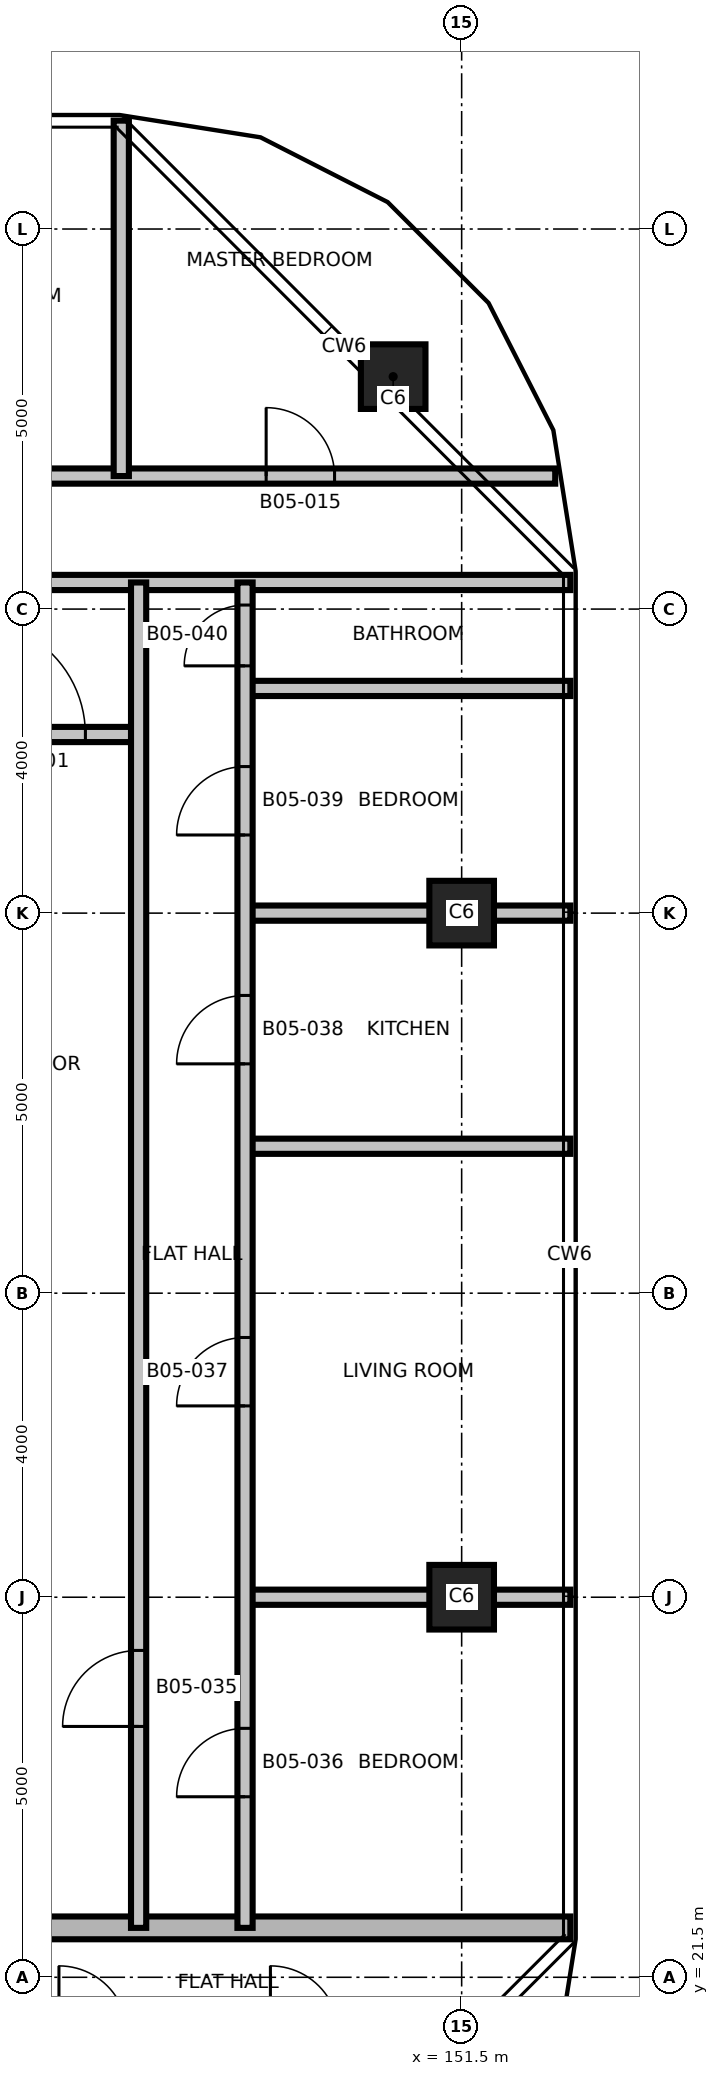
"""IFC4 building model, lengths in metres.
Left out: names, types, materials, properties, quantities, classifications, styles, units other than length and angle.
Written with IfcOpenShell. Run it as: python <this file> out.ifc"""

import sys

from ifc_helpers import new_model, si_unit, direction, frame, frame_2d, origin, origin_2d, place, context, subcontext, project, spatial, rectangle, extrude, element, fill, save


model = new_model("IFC4")
c1 = context("Model", 3, precision=1e-05, world=origin(), true_north=direction((0.0, 1.0)))
c2 = subcontext(c1, "Body", "Model", "MODEL_VIEW")
j1 = project(units=[si_unit("LENGTHUNIT", "METRE"), si_unit("PLANEANGLEUNIT", "RADIAN")], contexts=[c1])
p1 = place(None, origin())
s1 = spatial("IfcSite", under=j1, at=p1, CompositionType="ELEMENT")
p2 = place(p1, origin())
s2 = spatial("IfcBuilding", under=s1, at=p2, CompositionType="ELEMENT")
p3 = place(p2, frame((0.0, 0.0, 74.2)))
s3 = spatial("IfcBuildingStorey", under=s2, at=p3, CompositionType="ELEMENT", Elevation=74.2)
for number, where, z_axis, x_axis in (
    (1, (151.5, 26.5, 0.0), (0.0, 0.0, 1.0), (1.0, 0.0, 0.0)),
    (2, (151.5, 35.5, 0.0), (0.0, 0.0, 1.0), (1.0, 0.0, 0.0)),
    (3, (150.599, 42.558, 0.0), (0.0, 0.0, 1.0), (1.0, 0.0, 0.0)),
):
    element("IfcColumn", number, at=place(p3, frame(where, z_axis=z_axis, x_axis=x_axis)), inside=s3, PredefinedType="COLUMN", context=c2, shape_type="SweptSolid", body=[
        extrude(rectangle(XDim=0.85, YDim=0.85, at=origin_2d()), origin(), (0.0, 0.0, 1.0), 3.7),
    ])
p4 = place(p3, frame((120.07, 22.15, 0.0), z_axis=(0.0, 0.0, 1.0), x_axis=(1.0, 0.0, 0.0)))
e4 = element("IfcWall", 4, at=p4, inside=s3, PredefinedType="SHEAR", context=c2, shape_type="SweptSolid", body=[
    extrude(rectangle(XDim=32.86, YDim=0.3, at=frame_2d((16.43, 0.0))), origin(), (0.0, 0.0, 1.0), 3.4),
])
p5 = place(p4, frame((22.68, 0.0, 0.0)))
e5 = element("IfcOpeningElement", 5, at=p5, cuts=e4, PredefinedType="OPENING", context=c2, shape_type="SweptSolid", body=[
    extrude(rectangle(XDim=1.0, YDim=2.1, at=frame_2d((0.5, 1.05))), frame((0.0, 0.16, 0.0), z_axis=(0.0, -1.0, 0.0), x_axis=(1.0, 0.0, 0.0)), (0.0, 0.0, 1.0), 0.32),
])
p6 = place(p4, frame((11.03, 0.0, 0.0)))
e6 = element("IfcOpeningElement", 6, at=p6, cuts=e4, PredefinedType="OPENING", context=c2, shape_type="SweptSolid", body=[
    extrude(rectangle(XDim=1.0, YDim=2.1, at=frame_2d((0.5, 1.05))), frame((0.0, 0.16, 0.0), z_axis=(0.0, -1.0, 0.0), x_axis=(1.0, 0.0, 0.0)), (0.0, 0.0, 1.0), 0.32),
])
p7 = place(p4, frame((24.58, 0.0, 0.0)))
e7 = element("IfcOpeningElement", 7, at=p7, cuts=e4, PredefinedType="OPENING", context=c2, shape_type="SweptSolid", body=[
    extrude(rectangle(XDim=1.0, YDim=2.1, at=frame_2d((0.5, 1.05))), frame((0.0, 0.16, 0.0), z_axis=(0.0, -1.0, 0.0), x_axis=(1.0, 0.0, 0.0)), (0.0, 0.0, 1.0), 0.32),
])
p8 = place(p4, frame((16.68, 0.0, 0.0)))
e8 = element("IfcOpeningElement", 8, at=p8, cuts=e4, PredefinedType="OPENING", context=c2, shape_type="SweptSolid", body=[
    extrude(rectangle(XDim=0.9, YDim=2.1, at=frame_2d((0.45, 1.05))), frame((0.0, 0.16, 0.0), z_axis=(0.0, -1.0, 0.0), x_axis=(1.0, 0.0, 0.0)), (0.0, 0.0, 1.0), 0.32),
])
for number, where, z_axis, x_axis in (
    (9, (148.65, 26.5, 0.0), (0.0, 0.0, 1.0), (1.0, 0.0, 0.0)),
    (10, (148.65, 32.433, 0.0), (0.0, 0.0, 1.0), (1.0, 0.0, 0.0)),
    (11, (148.65, 35.5, 0.0), (0.0, 0.0, 1.0), (1.0, 0.0, 0.0)),
):
    element("IfcWall", number, at=place(p3, frame(where, z_axis=z_axis, x_axis=x_axis)), inside=s3, PredefinedType="PARTITIONING", context=c2, shape_type="SweptSolid", body=[
        extrude(rectangle(XDim=4.28, YDim=0.2, at=frame_2d((2.14, 0.0))), origin(), (0.0, 0.0, 1.0), 3.4),
    ])
p9 = place(p3, frame((144.02, 37.85, 0.0), z_axis=(0.0, 0.0, 1.0), x_axis=(1.0, 0.0, 0.0)))
e12 = element("IfcWall", 12, at=p9, inside=s3, PredefinedType="PARTITIONING", context=c2, shape_type="SweptSolid", body=[
    extrude(rectangle(XDim=3.23, YDim=0.2, at=frame_2d((1.615, 0.0))), origin(), (0.0, 0.0, 1.0), 3.4),
])
p10 = place(p9, frame((1.03, 0.0, 0.0)))
e13 = element("IfcOpeningElement", 13, at=p10, cuts=e12, PredefinedType="OPENING", context=c2, shape_type="SweptSolid", body=[
    extrude(rectangle(XDim=1.5, YDim=2.1, at=frame_2d((0.75, 1.05))), frame((0.0, 0.11, 0.0), z_axis=(0.0, -1.0, 0.0), x_axis=(1.0, 0.0, 0.0)), (0.0, 0.0, 1.0), 0.22),
])
p11 = place(p3, frame((148.65, 38.456, 0.0), z_axis=(0.0, 0.0, 1.0), x_axis=(1.0, 0.0, 0.0)))
e14 = element("IfcWall", 14, at=p11, inside=s3, PredefinedType="PARTITIONING", context=c2, shape_type="SweptSolid", body=[
    extrude(rectangle(XDim=4.28, YDim=0.2, at=frame_2d((2.14, 0.0))), origin(), (0.0, 0.0, 1.0), 3.4),
])
p12 = place(p3, frame((120.07, 39.85, 0.0), z_axis=(0.0, 0.0, 1.0), x_axis=(1.0, 0.0, 0.0)))
e15 = element("IfcWall", 15, at=p12, inside=s3, PredefinedType="PARTITIONING", context=c2, shape_type="SweptSolid", body=[
    extrude(rectangle(XDim=32.86, YDim=0.2, at=frame_2d((16.43, 0.0))), origin(), (0.0, 0.0, 1.0), 3.4),
])
p13 = place(p12, frame((11.03, 0.0, 0.0)))
e16 = element("IfcOpeningElement", 16, at=p13, cuts=e15, PredefinedType="OPENING", context=c2, shape_type="SweptSolid", body=[
    extrude(rectangle(XDim=1.0, YDim=2.1, at=frame_2d((0.5, 1.05))), frame((0.0, 0.11, 0.0), z_axis=(0.0, -1.0, 0.0), x_axis=(1.0, 0.0, 0.0)), (0.0, 0.0, 1.0), 0.22),
])
p14 = place(p12, frame((20.83, 0.0, 0.0)))
e17 = element("IfcOpeningElement", 17, at=p14, cuts=e15, PredefinedType="OPENING", context=c2, shape_type="SweptSolid", body=[
    extrude(rectangle(XDim=1.0, YDim=2.1, at=frame_2d((0.5, 1.05))), frame((0.0, 0.11, 0.0), z_axis=(0.0, -1.0, 0.0), x_axis=(1.0, 0.0, 0.0)), (0.0, 0.0, 1.0), 0.22),
])
p15 = place(p3, frame((120.269, 41.25, 0.0), z_axis=(0.0, 0.0, 1.0), x_axis=(1.0, 0.0, 0.0)))
e18 = element("IfcWall", 18, at=p15, inside=s3, PredefinedType="PARTITIONING", context=c2, shape_type="SweptSolid", body=[
    extrude(rectangle(XDim=32.462, YDim=0.2, at=frame_2d((16.231, 0.0))), origin(), (0.0, 0.0, 1.0), 3.4),
])
p16 = place(p15, frame((0.414, 0.0, 0.0)))
e19 = element("IfcOpeningElement", 19, at=p16, cuts=e18, PredefinedType="OPENING", context=c2, shape_type="SweptSolid", body=[
    extrude(rectangle(XDim=0.9, YDim=2.1, at=frame_2d((0.45, 1.05))), frame((0.0, 0.11, 0.0), z_axis=(0.0, -1.0, 0.0), x_axis=(1.0, 0.0, 0.0)), (0.0, 0.0, 1.0), 0.22),
])
p17 = place(p15, frame((4.581, 0.0, 0.0)))
e20 = element("IfcOpeningElement", 20, at=p17, cuts=e18, PredefinedType="OPENING", context=c2, shape_type="SweptSolid", body=[
    extrude(rectangle(XDim=0.9, YDim=2.1, at=frame_2d((0.45, 1.05))), frame((0.0, 0.11, 0.0), z_axis=(0.0, -1.0, 0.0), x_axis=(1.0, 0.0, 0.0)), (0.0, 0.0, 1.0), 0.22),
])
p18 = place(p15, frame((7.381, 0.0, 0.0)))
e21 = element("IfcOpeningElement", 21, at=p18, cuts=e18, PredefinedType="OPENING", context=c2, shape_type="SweptSolid", body=[
    extrude(rectangle(XDim=0.8, YDim=2.1, at=frame_2d((0.4, 1.05))), frame((0.0, 0.11, 0.0), z_axis=(0.0, -1.0, 0.0), x_axis=(1.0, 0.0, 0.0)), (0.0, 0.0, 1.0), 0.22),
])
p19 = place(p15, frame((10.748, 0.0, 0.0)))
e22 = element("IfcOpeningElement", 22, at=p19, cuts=e18, PredefinedType="OPENING", context=c2, shape_type="SweptSolid", body=[
    extrude(rectangle(XDim=0.9, YDim=2.1, at=frame_2d((0.45, 1.05))), frame((0.0, 0.11, 0.0), z_axis=(0.0, -1.0, 0.0), x_axis=(1.0, 0.0, 0.0)), (0.0, 0.0, 1.0), 0.22),
])
p20 = place(p15, frame((14.498, 0.0, 0.0)))
e23 = element("IfcOpeningElement", 23, at=p20, cuts=e18, PredefinedType="OPENING", context=c2, shape_type="SweptSolid", body=[
    extrude(rectangle(XDim=0.9, YDim=2.1, at=frame_2d((0.45, 1.05))), frame((0.0, 0.11, 0.0), z_axis=(0.0, -1.0, 0.0), x_axis=(1.0, 0.0, 0.0)), (0.0, 0.0, 1.0), 0.22),
])
p21 = place(p15, frame((18.248, 0.0, 0.0)))
e24 = element("IfcOpeningElement", 24, at=p21, cuts=e18, PredefinedType="OPENING", context=c2, shape_type="SweptSolid", body=[
    extrude(rectangle(XDim=0.9, YDim=2.1, at=frame_2d((0.45, 1.05))), frame((0.0, 0.11, 0.0), z_axis=(0.0, -1.0, 0.0), x_axis=(1.0, 0.0, 0.0)), (0.0, 0.0, 1.0), 0.22),
])
p22 = place(p15, frame((21.998, 0.0, 0.0)))
e25 = element("IfcOpeningElement", 25, at=p22, cuts=e18, PredefinedType="OPENING", context=c2, shape_type="SweptSolid", body=[
    extrude(rectangle(XDim=0.9, YDim=2.1, at=frame_2d((0.45, 1.05))), frame((0.0, 0.11, 0.0), z_axis=(0.0, -1.0, 0.0), x_axis=(1.0, 0.0, 0.0)), (0.0, 0.0, 1.0), 0.22),
])
p23 = place(p15, frame((24.842, 0.0, 0.0)))
e26 = element("IfcOpeningElement", 26, at=p23, cuts=e18, PredefinedType="OPENING", context=c2, shape_type="SweptSolid", body=[
    extrude(rectangle(XDim=0.8, YDim=2.1, at=frame_2d((0.4, 1.05))), frame((0.0, 0.11, 0.0), z_axis=(0.0, -1.0, 0.0), x_axis=(1.0, 0.0, 0.0)), (0.0, 0.0, 1.0), 0.22),
])
p24 = place(p15, frame((28.659, 0.0, 0.0)))
e27 = element("IfcOpeningElement", 27, at=p24, cuts=e18, PredefinedType="OPENING", context=c2, shape_type="SweptSolid", body=[
    extrude(rectangle(XDim=0.9, YDim=2.1, at=frame_2d((0.45, 1.05))), frame((0.0, 0.11, 0.0), z_axis=(0.0, -1.0, 0.0), x_axis=(1.0, 0.0, 0.0)), (0.0, 0.0, 1.0), 0.22),
])
p25 = place(p3, frame((147.022, 41.25, 0.0), z_axis=(0.0, 0.0, 1.0), x_axis=(0.0, 1.0, 0.0)))
e28 = element("IfcWall", 28, at=p25, inside=s3, PredefinedType="PARTITIONING", context=c2, shape_type="SweptSolid", body=[
    extrude(rectangle(XDim=4.676, YDim=0.2, at=frame_2d((2.338, 0.0))), origin(), (0.0, 0.0, 1.0), 3.4),
])
p26 = place(p3, frame((147.25, 22.15, 0.0), z_axis=(0.0, 0.0, 1.0), x_axis=(0.0, 1.0, 0.0)))
e29 = element("IfcWall", 29, at=p26, inside=s3, PredefinedType="PARTITIONING", context=c2, shape_type="SweptSolid", body=[
    extrude(rectangle(XDim=17.7, YDim=0.2, at=frame_2d((8.85, 0.0))), origin(), (0.0, 0.0, 1.0), 3.4),
])
p27 = place(p26, frame((2.65, 0.0, 0.0)))
e30 = element("IfcOpeningElement", 30, at=p27, cuts=e29, PredefinedType="OPENING", context=c2, shape_type="SweptSolid", body=[
    extrude(rectangle(XDim=1.0, YDim=2.1, at=frame_2d((0.5, 1.05))), frame((0.0, 0.11, 0.0), z_axis=(0.0, -1.0, 0.0), x_axis=(1.0, 0.0, 0.0)), (0.0, 0.0, 1.0), 0.22),
])
p28 = place(p3, frame((148.65, 22.15, 0.0), z_axis=(0.0, 0.0, 1.0), x_axis=(0.0, 1.0, 0.0)))
e31 = element("IfcWall", 31, at=p28, inside=s3, PredefinedType="PARTITIONING", context=c2, shape_type="SweptSolid", body=[
    extrude(rectangle(XDim=17.7, YDim=0.2, at=frame_2d((8.85, 0.0))), origin(), (0.0, 0.0, 1.0), 3.4),
])
p29 = place(p28, frame((1.725, 0.0, 0.0)))
e32 = element("IfcOpeningElement", 32, at=p29, cuts=e31, PredefinedType="OPENING", context=c2, shape_type="SweptSolid", body=[
    extrude(rectangle(XDim=0.9, YDim=2.1, at=frame_2d((0.45, 1.05))), frame((0.0, 0.11, 0.0), z_axis=(0.0, -1.0, 0.0), x_axis=(1.0, 0.0, 0.0)), (0.0, 0.0, 1.0), 0.22),
])
p30 = place(p28, frame((6.867, 0.0, 0.0)))
e33 = element("IfcOpeningElement", 33, at=p30, cuts=e31, PredefinedType="OPENING", context=c2, shape_type="SweptSolid", body=[
    extrude(rectangle(XDim=0.9, YDim=2.1, at=frame_2d((0.45, 1.05))), frame((0.0, 0.11, 0.0), z_axis=(0.0, -1.0, 0.0), x_axis=(1.0, 0.0, 0.0)), (0.0, 0.0, 1.0), 0.22),
])
p31 = place(p28, frame((11.367, 0.0, 0.0)))
e34 = element("IfcOpeningElement", 34, at=p31, cuts=e31, PredefinedType="OPENING", context=c2, shape_type="SweptSolid", body=[
    extrude(rectangle(XDim=0.9, YDim=2.1, at=frame_2d((0.45, 1.05))), frame((0.0, 0.11, 0.0), z_axis=(0.0, -1.0, 0.0), x_axis=(1.0, 0.0, 0.0)), (0.0, 0.0, 1.0), 0.22),
])
p32 = place(p28, frame((14.378, 0.0, 0.0)))
e35 = element("IfcOpeningElement", 35, at=p32, cuts=e31, PredefinedType="OPENING", context=c2, shape_type="SweptSolid", body=[
    extrude(rectangle(XDim=0.9, YDim=2.1, at=frame_2d((0.45, 1.05))), frame((0.0, 0.11, 0.0), z_axis=(0.0, -1.0, 0.0), x_axis=(1.0, 0.0, 0.0)), (0.0, 0.0, 1.0), 0.22),
])
p33 = place(p28, frame((16.603, 0.0, 0.0)))
e36 = element("IfcOpeningElement", 36, at=p33, cuts=e31, PredefinedType="OPENING", context=c2, shape_type="SweptSolid", body=[
    extrude(rectangle(XDim=0.8, YDim=2.1, at=frame_2d((0.4, 1.05))), frame((0.0, 0.11, 0.0), z_axis=(0.0, -1.0, 0.0), x_axis=(1.0, 0.0, 0.0)), (0.0, 0.0, 1.0), 0.22),
])
p34 = place(p10, origin())
e37 = element("IfcDoor", 37, at=p34, inside=s3, OperationType="SINGLE_SWING_LEFT", PredefinedType="DOOR", context=c2, shape_type="SweptSolid", body=[
    extrude(rectangle(XDim=1.5, YDim=2.1, at=frame_2d((0.75, 1.05))), frame((0.0, 0.025, 0.0), z_axis=(0.0, -1.0, 0.0), x_axis=(1.0, 0.0, 0.0)), (0.0, 0.0, 1.0), 0.05),
])
fill(e13, e37)
p35 = place(p24, origin())
e38 = element("IfcDoor", 38, at=p35, inside=s3, OperationType="SINGLE_SWING_LEFT", PredefinedType="DOOR", context=c2, shape_type="SweptSolid", body=[
    extrude(rectangle(XDim=0.9, YDim=2.1, at=frame_2d((0.45, 1.05))), frame((0.0, 0.025, 0.0), z_axis=(0.0, -1.0, 0.0), x_axis=(1.0, 0.0, 0.0)), (0.0, 0.0, 1.0), 0.05),
])
fill(e27, e38)
p36 = place(p27, origin())
e39 = element("IfcDoor", 39, at=p36, inside=s3, OperationType="SINGLE_SWING_LEFT", PredefinedType="DOOR", context=c2, shape_type="SweptSolid", body=[
    extrude(rectangle(XDim=1.0, YDim=2.1, at=frame_2d((0.5, 1.05))), frame((0.0, 0.025, 0.0), z_axis=(0.0, -1.0, 0.0), x_axis=(1.0, 0.0, 0.0)), (0.0, 0.0, 1.0), 0.05),
])
fill(e30, e39)
p37 = place(p29, origin())
e40 = element("IfcDoor", 40, at=p37, inside=s3, OperationType="SINGLE_SWING_RIGHT", PredefinedType="DOOR", context=c2, shape_type="SweptSolid", body=[
    extrude(rectangle(XDim=0.9, YDim=2.1, at=frame_2d((0.45, 1.05))), frame((0.0, 0.025, 0.0), z_axis=(0.0, -1.0, 0.0), x_axis=(1.0, 0.0, 0.0)), (0.0, 0.0, 1.0), 0.05),
])
fill(e32, e40)
p38 = place(p30, origin())
e41 = element("IfcDoor", 41, at=p38, inside=s3, OperationType="SINGLE_SWING_LEFT", PredefinedType="DOOR", context=c2, shape_type="SweptSolid", body=[
    extrude(rectangle(XDim=0.9, YDim=2.1, at=frame_2d((0.45, 1.05))), frame((0.0, 0.025, 0.0), z_axis=(0.0, -1.0, 0.0), x_axis=(1.0, 0.0, 0.0)), (0.0, 0.0, 1.0), 0.05),
])
fill(e33, e41)
p39 = place(p31, origin())
e42 = element("IfcDoor", 42, at=p39, inside=s3, OperationType="SINGLE_SWING_RIGHT", PredefinedType="DOOR", context=c2, shape_type="SweptSolid", body=[
    extrude(rectangle(XDim=0.9, YDim=2.1, at=frame_2d((0.45, 1.05))), frame((0.0, 0.025, 0.0), z_axis=(0.0, -1.0, 0.0), x_axis=(1.0, 0.0, 0.0)), (0.0, 0.0, 1.0), 0.05),
])
fill(e34, e42)
p40 = place(p32, origin())
e43 = element("IfcDoor", 43, at=p40, inside=s3, OperationType="SINGLE_SWING_LEFT", PredefinedType="DOOR", context=c2, shape_type="SweptSolid", body=[
    extrude(rectangle(XDim=0.9, YDim=2.1, at=frame_2d((0.45, 1.05))), frame((0.0, 0.025, 0.0), z_axis=(0.0, -1.0, 0.0), x_axis=(1.0, 0.0, 0.0)), (0.0, 0.0, 1.0), 0.05),
])
fill(e35, e43)
p41 = place(p33, origin())
e44 = element("IfcDoor", 44, at=p41, inside=s3, OperationType="SINGLE_SWING_RIGHT", PredefinedType="DOOR", context=c2, shape_type="SweptSolid", body=[
    extrude(rectangle(XDim=0.8, YDim=2.1, at=frame_2d((0.4, 1.05))), frame((0.0, 0.025, 0.0), z_axis=(0.0, -1.0, 0.0), x_axis=(1.0, 0.0, 0.0)), (0.0, 0.0, 1.0), 0.05),
])
fill(e36, e44)
save(model, sys.argv[1])
